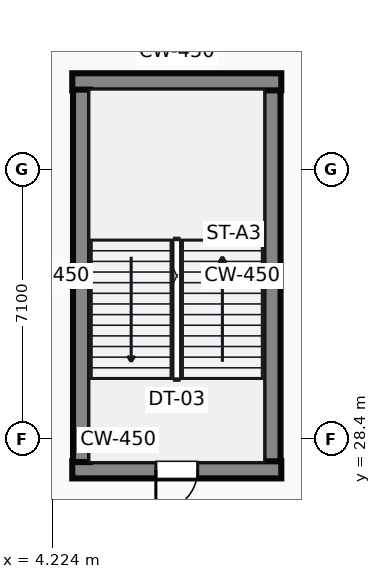
"""IFC4 building model, lengths in metres.
Left out: names, types, materials, properties, quantities, classifications, styles, units other than length and angle.
Written with IfcOpenShell. Run it as: python <this file> out.ifc"""

import sys

from ifc_helpers import new_model, si_unit, direction, frame, frame_2d, origin, place, context, subcontext, project, spatial, rectangle, extrude, source, transform, mapped, element, fill, save


model = new_model("IFC4")
c1 = context("Model", 3, precision=1e-05, world=origin(), true_north=direction((0.0, 1.0)))
c2 = subcontext(c1, "Body", "Model", "MODEL_VIEW")
j1 = project(units=[si_unit("LENGTHUNIT", "METRE"), si_unit("PLANEANGLEUNIT", "RADIAN")], contexts=[c1])
p1 = place(None, origin())
s1 = spatial("IfcSite", under=j1, at=p1, CompositionType="ELEMENT")
p2 = place(p1, origin())
s2 = spatial("IfcBuilding", under=s1, at=p2, CompositionType="ELEMENT")
p3 = place(p2, frame((0.0, 0.0, 11.0)))
s3 = spatial("IfcBuildingStorey", under=s2, at=p3, CompositionType="ELEMENT", Elevation=11.0)
m1 = source(origin(), c2, "Body", "SweptSolid", [
    extrude(rectangle(XDim=5.5, YDim=0.45, at=frame_2d((2.75, 0.0))), origin(), (0.0, 0.0, 1.0), 5.0),
])
p4 = place(p3, frame((4.75, 27.595, 0.0), z_axis=(0.0, 0.0, 1.0), x_axis=(1.0, 0.0, 0.0)))
e1 = element("IfcWall", 1, at=p4, inside=s3, PredefinedType="SHEAR", context=c2, shape_type="MappedRepresentation", body=[
    mapped(m1, transform((0.0, 0.0, 0.0))),
])
p5 = place(p4, frame((2.2, 0.0, 0.0)))
e2 = element("IfcOpeningElement", 2, at=p5, cuts=e1, PredefinedType="OPENING", context=c2, shape_type="SweptSolid", body=[
    extrude(rectangle(XDim=1.1, YDim=2.15, at=frame_2d((0.55, 1.075))), frame((0.0, 0.235, 0.0), z_axis=(0.0, -1.0, 0.0), x_axis=(1.0, 0.0, 0.0)), (0.0, 0.0, 1.0), 0.47),
])
m2 = source(origin(), c2, "Body", "SweptSolid", [
    extrude(rectangle(XDim=9.8, YDim=0.45, at=frame_2d((4.9, 0.0))), origin(), (0.0, 0.0, 1.0), 5.0),
])
for number, where, z_axis, x_axis in (
    (3, (4.995, 27.8, 0.0), (0.0, 0.0, 1.0), (0.0, 1.0, 0.0)),
    (4, (10.005, 27.8, 0.0), (0.0, 0.0, 1.0), (0.0, 1.0, 0.0)),
):
    element("IfcWall", number, at=place(p3, frame(where, z_axis=z_axis, x_axis=x_axis)), inside=s3, PredefinedType="SHEAR", context=c2, shape_type="MappedRepresentation", body=[
        mapped(m2, transform((0.0, 0.0, 0.0))),
    ])
p6 = place(p3, frame((4.75, 37.805, 0.0), z_axis=(0.0, 0.0, 1.0), x_axis=(1.0, 0.0, 0.0)))
e5 = element("IfcWall", 5, at=p6, inside=s3, PredefinedType="SHEAR", context=c2, shape_type="MappedRepresentation", body=[
    mapped(m1, transform((0.0, 0.0, 0.0))),
])
m3 = source(origin(), c2, "Body", "SweptSolid", [
    extrude(rectangle(XDim=1.1, YDim=2.15, at=frame_2d((0.55, 1.075))), frame((0.0, 0.025, 0.0), z_axis=(0.0, -1.0, 0.0), x_axis=(1.0, 0.0, 0.0)), (0.0, 0.0, 1.0), 0.05),
])
p7 = place(p5, origin())
e6 = element("IfcDoor", 6, at=p7, inside=s3, OperationType="SINGLE_SWING_LEFT", PredefinedType="DOOR", context=c2, shape_type="MappedRepresentation", body=[
    mapped(m3, transform((0.0, 0.0, 0.0))),
])
fill(e2, e6)
save(model, sys.argv[1])
